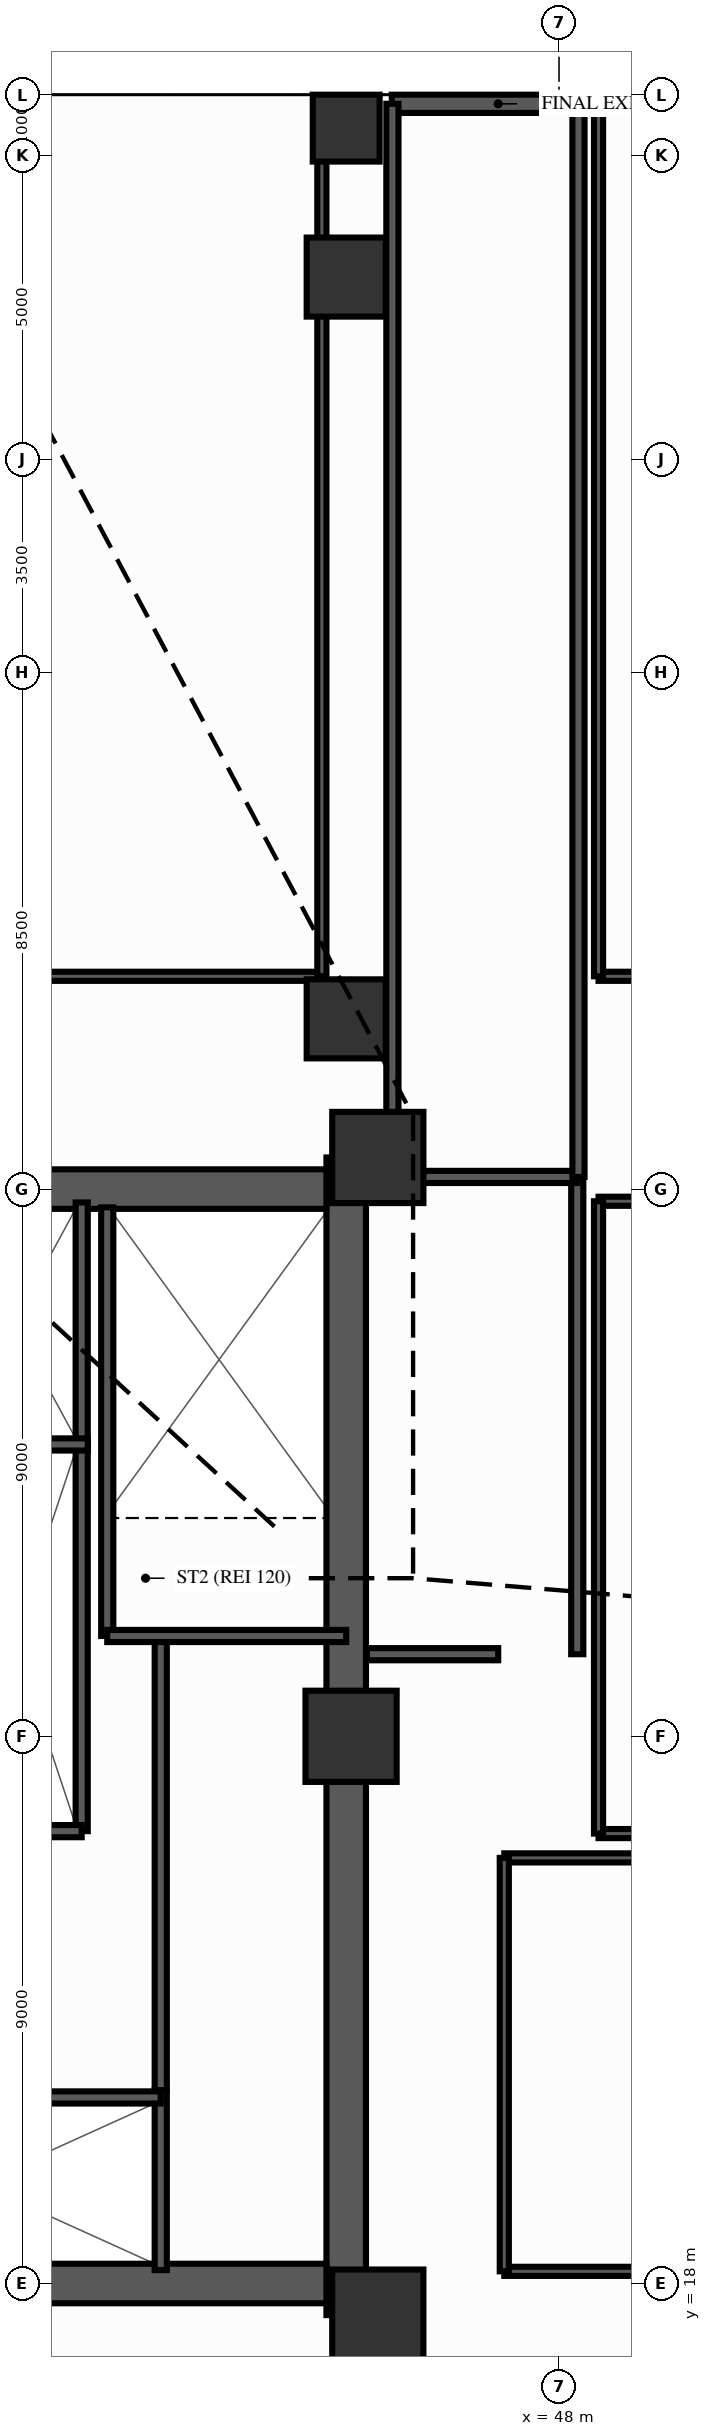
"""IFC4 building model, lengths in metres.
Left out: names, types, materials, properties, quantities, classifications, styles, units other than length and angle.
Written with IfcOpenShell. Run it as: python <this file> out.ifc"""

import sys

from ifc_helpers import new_model, si_unit, direction, frame, frame_2d, origin, origin_2d, place, context, subcontext, project, spatial, rectangle, extrude, source, transform, mapped, element, fill, save


model = new_model("IFC4")
c1 = context("Model", 3, precision=1e-05, world=origin(), true_north=direction((0.0, 1.0)))
c2 = subcontext(c1, "Body", "Model", "MODEL_VIEW")
j1 = project(units=[si_unit("LENGTHUNIT", "METRE"), si_unit("PLANEANGLEUNIT", "RADIAN")], contexts=[c1])
p1 = place(None, origin())
s1 = spatial("IfcSite", under=j1, at=p1, CompositionType="ELEMENT")
p2 = place(p1, origin())
s2 = spatial("IfcBuilding", under=s1, at=p2, CompositionType="ELEMENT")
p3 = place(p2, origin())
s3 = spatial("IfcBuildingStorey", under=s2, at=p3, CompositionType="ELEMENT", Elevation=0.0)
p4 = place(p3, frame((44.5, 17.48, 0.0), z_axis=(0.0, 0.0, 1.0), x_axis=(0.0, 1.0, 0.0)))
e1 = element("IfcWall", 1, at=p4, inside=s3, PredefinedType="SHEAR", context=c2, shape_type="SweptSolid", body=[
    extrude(rectangle(XDim=19.04, YDim=0.65, at=frame_2d((9.52, 0.0))), origin(), (0.0, 0.0, 1.0), 4.2),
])
p5 = place(p4, frame((12.67, 0.0, 0.0), z_axis=(0.0, 0.0, 1.0), x_axis=(-1.0, 0.0, 0.0)))
e2 = element("IfcOpeningElement", 2, at=p5, cuts=e1, PredefinedType="OPENING", context=c2, shape_type="SweptSolid", body=[
    extrude(rectangle(XDim=1.1, YDim=2.15, at=frame_2d((0.55, 1.075))), frame((0.0, 0.337, 0.0), z_axis=(0.0, -1.0, 0.0), x_axis=(1.0, 0.0, 0.0)), (0.0, 0.0, 1.0), 0.674),
])
p6 = place(p3, frame((31.825, 18.0, 0.0), z_axis=(0.0, 0.0, 1.0), x_axis=(1.0, 0.0, 0.0)))
e3 = element("IfcWall", 3, at=p6, inside=s3, PredefinedType="SHEAR", context=c2, shape_type="SweptSolid", body=[
    extrude(rectangle(XDim=12.35, YDim=0.65, at=frame_2d((6.175, 0.0))), origin(), (0.0, 0.0, 1.0), 4.2),
])
p7 = place(p3, frame((31.825, 36.0, 0.0), z_axis=(0.0, 0.0, 1.0), x_axis=(1.0, 0.0, 0.0)))
e4 = element("IfcWall", 4, at=p7, inside=s3, PredefinedType="SHEAR", context=c2, shape_type="SweptSolid", body=[
    extrude(rectangle(XDim=12.35, YDim=0.65, at=frame_2d((6.175, 0.0))), origin(), (0.0, 0.0, 1.0), 4.2),
])
p8 = place(p7, frame((5.125, 0.0, 0.0), z_axis=(0.0, 0.0, 1.0), x_axis=(-1.0, 0.0, 0.0)))
e5 = element("IfcOpeningElement", 5, at=p8, cuts=e4, PredefinedType="OPENING", context=c2, shape_type="SweptSolid", body=[
    extrude(rectangle(XDim=1.4, YDim=2.15, at=frame_2d((0.7, 1.075))), frame((0.0, 0.337, 0.0), z_axis=(0.0, -1.0, 0.0), x_axis=(1.0, 0.0, 0.0)), (0.0, 0.0, 1.0), 0.674),
])
m1 = source(origin(), c2, "Body", "SweptSolid", [
    extrude(rectangle(XDim=1.5, YDim=1.5, at=origin_2d()), origin(), (0.0, 0.0, 1.0), 4.2),
])
for number, where, z_axis, x_axis in (
    (6, (45.02, 17.48, 0.0), (0.0, 0.0, 1.0), (1.0, 0.0, 0.0)),
    (7, (45.02, 36.52, 0.0), (0.0, 0.0, 1.0), (1.0, 0.0, 0.0)),
    (8, (44.58, 27.0, 0.0), (0.0, 0.0, 1.0), (1.0, 0.0, 0.0)),
):
    element("IfcColumn", number, at=place(p3, frame(where, z_axis=z_axis, x_axis=x_axis)), inside=s3, PredefinedType="COLUMN", context=c2, shape_type="MappedRepresentation", body=[
        mapped(m1, transform((0.0, 0.0, 0.0), scale=1.0)),
    ])
m2 = source(origin(), c2, "Body", "SweptSolid", [
    extrude(rectangle(XDim=1.3, YDim=1.3, at=origin_2d()), origin(), (0.0, 0.0, 1.0), 4.2),
])
for number, where, z_axis, x_axis in (
    (9, (44.5, 38.8, 0.0), (0.0, 0.0, 1.0), (1.0, 0.0, 0.0)),
    (10, (44.5, 51.0, 0.0), (0.0, 0.0, 1.0), (1.0, 0.0, 0.0)),
):
    element("IfcColumn", number, at=place(p3, frame(where, z_axis=z_axis, x_axis=x_axis)), inside=s3, PredefinedType="COLUMN", context=c2, shape_type="MappedRepresentation", body=[
        mapped(m2, transform((0.0, 0.0, 0.0), scale=1.0)),
    ])
m3 = source(origin(), c2, "Body", "SweptSolid", [
    extrude(rectangle(XDim=1.1, YDim=1.1, at=origin_2d()), origin(), (0.0, 0.0, 1.0), 4.2),
])
p9 = place(p3, frame((44.5, 53.45, 0.0), z_axis=(0.0, 0.0, 1.0), x_axis=(1.0, 0.0, 0.0)))
e11 = element("IfcColumn", 11, at=p9, inside=s3, PredefinedType="COLUMN", context=c2, shape_type="MappedRepresentation", body=[
    mapped(m3, transform((0.0, 0.0, 0.0), scale=1.0)),
])
p10 = place(p3, frame((45.25, 53.85, 0.0), z_axis=(0.0, 0.0, 1.0), x_axis=(1.0, 0.0, 0.0)))
e12 = element("IfcWall", 12, at=p10, inside=s3, PredefinedType="SOLIDWALL", context=c2, shape_type="SweptSolid", body=[
    extrude(rectangle(XDim=30.75, YDim=0.3, at=frame_2d((15.375, 0.0))), origin(), (0.0, 0.0, 1.0), 3.48),
])
p11 = place(p10, frame((1.05, 0.0, 0.0)))
e13 = element("IfcOpeningElement", 13, at=p11, cuts=e12, PredefinedType="OPENING", context=c2, shape_type="SweptSolid", body=[
    extrude(rectangle(XDim=1.4, YDim=2.2, at=frame_2d((0.7, 1.1))), frame((0.0, 0.162, 0.0), z_axis=(0.0, -1.0, 0.0), x_axis=(1.0, 0.0, 0.0)), (0.0, 0.0, 1.0), 0.324),
])
p12 = place(p3, frame((41.45, 18.22, 0.0), z_axis=(0.0, 0.0, 1.0), x_axis=(0.0, 1.0, 0.0)))
e14 = element("IfcWall", 14, at=p12, inside=s3, PredefinedType="PARTITIONING", context=c2, shape_type="SweptSolid", body=[
    extrude(rectangle(XDim=2.96, YDim=0.2, at=frame_2d((1.48, 0.0))), origin(), (0.0, 0.0, 1.0), 3.92),
])
p13 = place(p3, frame((41.45, 21.18, 0.0), z_axis=(0.0, 0.0, 1.0), x_axis=(0.0, 1.0, 0.0)))
e15 = element("IfcWall", 15, at=p13, inside=s3, PredefinedType="PARTITIONING", context=c2, shape_type="SweptSolid", body=[
    extrude(rectangle(XDim=7.42, YDim=0.2, at=frame_2d((3.71, 0.0))), origin(), (0.0, 0.0, 1.0), 3.92),
])
p14 = place(p13, frame((2.6, 0.0, 0.0)))
e16 = element("IfcOpeningElement", 16, at=p14, cuts=e15, PredefinedType="OPENING", context=c2, shape_type="SweptSolid", body=[
    extrude(rectangle(XDim=0.9, YDim=2.1, at=frame_2d((0.45, 1.05))), frame((0.0, 0.112, 0.0), z_axis=(0.0, -1.0, 0.0), x_axis=(1.0, 0.0, 0.0)), (0.0, 0.0, 1.0), 0.224),
])
p15 = place(p3, frame((40.15, 25.44, 0.0), z_axis=(0.0, 0.0, 1.0), x_axis=(0.0, 1.0, 0.0)))
e17 = element("IfcWall", 17, at=p15, inside=s3, PredefinedType="PARTITIONING", context=c2, shape_type="SweptSolid", body=[
    extrude(rectangle(XDim=6.36, YDim=0.2, at=frame_2d((3.18, 0.0))), origin(), (0.0, 0.0, 1.0), 3.92),
])
p16 = place(p3, frame((40.15, 31.8, 0.0), z_axis=(0.0, 0.0, 1.0), x_axis=(0.0, 1.0, 0.0)))
e18 = element("IfcWall", 18, at=p16, inside=s3, PredefinedType="PARTITIONING", context=c2, shape_type="SweptSolid", body=[
    extrude(rectangle(XDim=3.98, YDim=0.2, at=frame_2d((1.99, 0.0))), origin(), (0.0, 0.0, 1.0), 3.92),
])
p17 = place(p3, frame((35.43, 21.06, 0.0), z_axis=(0.0, 0.0, 1.0), x_axis=(1.0, 0.0, 0.0)))
e19 = element("IfcWall", 19, at=p17, inside=s3, PredefinedType="PARTITIONING", context=c2, shape_type="SweptSolid", body=[
    extrude(rectangle(XDim=6.02, YDim=0.2, at=frame_2d((3.01, 0.0))), origin(), (0.0, 0.0, 1.0), 3.92),
])
p18 = place(p17, frame((1.0, 0.0, 0.0)))
e20 = element("IfcOpeningElement", 20, at=p18, cuts=e19, PredefinedType="OPENING", context=c2, shape_type="SweptSolid", body=[
    extrude(rectangle(XDim=1.1, YDim=2.15, at=frame_2d((0.55, 1.075))), frame((0.0, 0.112, 0.0), z_axis=(0.0, -1.0, 0.0), x_axis=(1.0, 0.0, 0.0)), (0.0, 0.0, 1.0), 0.224),
])
p19 = place(p17, frame((2.95, 0.0, 0.0)))
e21 = element("IfcOpeningElement", 21, at=p19, cuts=e19, PredefinedType="OPENING", context=c2, shape_type="SweptSolid", body=[
    extrude(rectangle(XDim=1.1, YDim=2.15, at=frame_2d((0.55, 1.075))), frame((0.0, 0.112, 0.0), z_axis=(0.0, -1.0, 0.0), x_axis=(1.0, 0.0, 0.0)), (0.0, 0.0, 1.0), 0.224),
])
p20 = place(p17, frame((4.58, 0.0, 0.0)))
e22 = element("IfcOpeningElement", 22, at=p20, cuts=e19, PredefinedType="OPENING", context=c2, shape_type="SweptSolid", body=[
    extrude(rectangle(XDim=1.2, YDim=2.15, at=frame_2d((0.6, 1.075))), frame((0.0, 0.112, 0.0), z_axis=(0.0, -1.0, 0.0), x_axis=(1.0, 0.0, 0.0)), (0.0, 0.0, 1.0), 0.224),
])
p21 = place(p3, frame((35.43, 25.44, 0.0), z_axis=(0.0, 0.0, 1.0), x_axis=(1.0, 0.0, 0.0)))
e23 = element("IfcWall", 23, at=p21, inside=s3, PredefinedType="PARTITIONING", context=c2, shape_type="SweptSolid", body=[
    extrude(rectangle(XDim=4.72, YDim=0.2, at=frame_2d((2.36, 0.0))), origin(), (0.0, 0.0, 1.0), 3.92),
])
p22 = place(p21, frame((1.25, 0.0, 0.0)))
e24 = element("IfcOpeningElement", 24, at=p22, cuts=e23, PredefinedType="OPENING", context=c2, shape_type="SweptSolid", body=[
    extrude(rectangle(XDim=1.1, YDim=2.15, at=frame_2d((0.55, 1.075))), frame((0.0, 0.112, 0.0), z_axis=(0.0, -1.0, 0.0), x_axis=(1.0, 0.0, 0.0)), (0.0, 0.0, 1.0), 0.224),
])
p23 = place(p3, frame((40.57, 28.65, 0.0), z_axis=(0.0, 0.0, 1.0), x_axis=(0.0, 1.0, 0.0)))
e25 = element("IfcWall", 25, at=p23, inside=s3, PredefinedType="SOLIDWALL", context=c2, shape_type="SweptSolid", body=[
    extrude(rectangle(XDim=7.05, YDim=0.2, at=frame_2d((3.525, 0.0))), origin(), (0.0, 0.0, 1.0), 3.92),
])
p24 = place(p3, frame((40.57, 28.65, 0.0), z_axis=(0.0, 0.0, 1.0), x_axis=(1.0, 0.0, 0.0)))
e26 = element("IfcWall", 26, at=p24, inside=s3, PredefinedType="SOLIDWALL", context=c2, shape_type="SweptSolid", body=[
    extrude(rectangle(XDim=3.93, YDim=0.2, at=frame_2d((1.965, 0.0))), origin(), (0.0, 0.0, 1.0), 3.92),
])
p25 = place(p3, frame((37.9, 31.8, 0.0), z_axis=(0.0, 0.0, 1.0), x_axis=(1.0, 0.0, 0.0)))
e27 = element("IfcWall", 27, at=p25, inside=s3, PredefinedType="PARTITIONING", context=c2, shape_type="SweptSolid", body=[
    extrude(rectangle(XDim=2.35, YDim=0.2, at=frame_2d((1.175, 0.0))), origin(), (0.0, 0.0, 1.0), 3.92),
])
p26 = place(p3, frame((44.84, 28.35, 0.0), z_axis=(0.0, 0.0, 1.0), x_axis=(1.0, 0.0, 0.0)))
e28 = element("IfcWall", 28, at=p26, inside=s3, PredefinedType="PARTITIONING", context=c2, shape_type="SweptSolid", body=[
    extrude(rectangle(XDim=2.16, YDim=0.2, at=frame_2d((1.08, 0.0))), origin(), (0.0, 0.0, 1.0), 3.92),
])
p27 = place(p26, frame((0.55, 0.0, 0.0)))
e29 = element("IfcOpeningElement", 29, at=p27, cuts=e28, PredefinedType="OPENING", context=c2, shape_type="SweptSolid", body=[
    extrude(rectangle(XDim=1.1, YDim=2.15, at=frame_2d((0.55, 1.075))), frame((0.0, 0.112, 0.0), z_axis=(0.0, -1.0, 0.0), x_axis=(1.0, 0.0, 0.0)), (0.0, 0.0, 1.0), 0.224),
])
p28 = place(p3, frame((48.3, 28.35, 0.0), z_axis=(0.0, 0.0, 1.0), x_axis=(0.0, 1.0, 0.0)))
e30 = element("IfcWall", 30, at=p28, inside=s3, PredefinedType="PARTITIONING", context=c2, shape_type="SweptSolid", body=[
    extrude(rectangle(XDim=7.85, YDim=0.2, at=frame_2d((3.925, 0.0))), origin(), (0.0, 0.0, 1.0), 3.92),
])
p29 = place(p3, frame((44.84, 36.2, 0.0), z_axis=(0.0, 0.0, 1.0), x_axis=(1.0, 0.0, 0.0)))
e31 = element("IfcWall", 31, at=p29, inside=s3, PredefinedType="PARTITIONING", context=c2, shape_type="SweptSolid", body=[
    extrude(rectangle(XDim=3.46, YDim=0.2, at=frame_2d((1.73, 0.0))), origin(), (0.0, 0.0, 1.0), 3.29),
])
p30 = place(p29, frame((1.36, 0.0, 0.0)))
e32 = element("IfcOpeningElement", 32, at=p30, cuts=e31, PredefinedType="OPENING", context=c2, shape_type="SweptSolid", body=[
    extrude(rectangle(XDim=1.1, YDim=2.15, at=frame_2d((0.55, 1.075))), frame((0.0, 0.112, 0.0), z_axis=(0.0, -1.0, 0.0), x_axis=(1.0, 0.0, 0.0)), (0.0, 0.0, 1.0), 0.224),
])
p31 = place(p3, frame((45.26, 36.2, 0.0), z_axis=(0.0, 0.0, 1.0), x_axis=(0.0, 1.0, 0.0)))
e33 = element("IfcWall", 33, at=p31, inside=s3, PredefinedType="PARTITIONING", context=c2, shape_type="SweptSolid", body=[
    extrude(rectangle(XDim=17.65, YDim=0.2, at=frame_2d((8.825, 0.0))), origin(), (0.0, 0.0, 1.0), 3.44),
])
p32 = place(p3, frame((48.32, 36.2, 0.0), z_axis=(0.0, 0.0, 1.0), x_axis=(0.0, 1.0, 0.0)))
e34 = element("IfcWall", 34, at=p32, inside=s3, PredefinedType="PARTITIONING", context=c2, shape_type="SweptSolid", body=[
    extrude(rectangle(XDim=17.65, YDim=0.2, at=frame_2d((8.825, 0.0))), origin(), (0.0, 0.0, 1.0), 3.92),
])
p33 = place(p32, frame((1.65, 0.0, 0.0)))
e35 = element("IfcOpeningElement", 35, at=p33, cuts=e34, PredefinedType="OPENING", context=c2, shape_type="SweptSolid", body=[
    extrude(rectangle(XDim=1.1, YDim=2.15, at=frame_2d((0.55, 1.075))), frame((0.0, 0.112, 0.0), z_axis=(0.0, -1.0, 0.0), x_axis=(1.0, 0.0, 0.0)), (0.0, 0.0, 1.0), 0.224),
])
for number, where, z_axis, x_axis in (
    (36, (47.1, 18.2, 0.0), (0.0, 0.0, 1.0), (1.0, 0.0, 0.0)),
    (37, (47.1, 25.0, 0.0), (0.0, 0.0, 1.0), (1.0, 0.0, 0.0)),
):
    element("IfcWall", number, at=place(p3, frame(where, z_axis=z_axis, x_axis=x_axis)), inside=s3, PredefinedType="PARTITIONING", context=c2, shape_type="SweptSolid", body=[
        extrude(rectangle(XDim=7.4, YDim=0.15, at=frame_2d((3.7, 0.0))), origin(), (0.0, 0.0, 1.0), 3.92),
    ])
p34 = place(p3, frame((47.1, 18.2, 0.0), z_axis=(0.0, 0.0, 1.0), x_axis=(0.0, 1.0, 0.0)))
e38 = element("IfcWall", 38, at=p34, inside=s3, PredefinedType="PARTITIONING", context=c2, shape_type="SweptSolid", body=[
    extrude(rectangle(XDim=6.8, YDim=0.15, at=frame_2d((3.4, 0.0))), origin(), (0.0, 0.0, 1.0), 3.92),
])
p35 = place(p34, frame((2.694, 0.0, 0.0)))
e39 = element("IfcOpeningElement", 39, at=p35, cuts=e38, PredefinedType="OPENING", context=c2, shape_type="SweptSolid", body=[
    extrude(rectangle(XDim=1.1, YDim=2.15, at=frame_2d((0.55, 1.075))), frame((0.0, 0.087, 0.0), z_axis=(0.0, -1.0, 0.0), x_axis=(1.0, 0.0, 0.0)), (0.0, 0.0, 1.0), 0.174),
])
p36 = place(p3, frame((35.3, 39.5, 0.0), z_axis=(0.0, 0.0, 1.0), x_axis=(1.0, 0.0, 0.0)))
e40 = element("IfcWall", 40, at=p36, inside=s3, PredefinedType="PARTITIONING", context=c2, shape_type="SweptSolid", body=[
    extrude(rectangle(XDim=8.8, YDim=0.15, at=frame_2d((4.4, 0.0))), origin(), (0.0, 0.0, 1.0), 3.92),
])
p37 = place(p36, frame((4.566, 0.0, 0.0)))
e41 = element("IfcOpeningElement", 41, at=p37, cuts=e40, PredefinedType="OPENING", context=c2, shape_type="SweptSolid", body=[
    extrude(rectangle(XDim=1.0, YDim=2.1, at=frame_2d((0.5, 1.05))), frame((0.0, 0.087, 0.0), z_axis=(0.0, -1.0, 0.0), x_axis=(1.0, 0.0, 0.0)), (0.0, 0.0, 1.0), 0.174),
])
p38 = place(p3, frame((44.1, 39.5, 0.0), z_axis=(0.0, 0.0, 1.0), x_axis=(0.0, 1.0, 0.0)))
e42 = element("IfcWall", 42, at=p38, inside=s3, PredefinedType="PARTITIONING", context=c2, shape_type="SweptSolid", body=[
    extrude(rectangle(XDim=14.4, YDim=0.15, at=frame_2d((7.2, 0.0))), origin(), (0.0, 0.0, 1.0), 3.92),
])
p39 = place(p3, frame((48.65, 39.5, 0.0), z_axis=(0.0, 0.0, 1.0), x_axis=(1.0, 0.0, 0.0)))
e43 = element("IfcWall", 43, at=p39, inside=s3, PredefinedType="PARTITIONING", context=c2, shape_type="SweptSolid", body=[
    extrude(rectangle(XDim=13.85, YDim=0.15, at=frame_2d((6.925, 0.0))), origin(), (0.0, 0.0, 1.0), 3.92),
])
p40 = place(p39, frame((6.045, 0.0, 0.0)))
e44 = element("IfcOpeningElement", 44, at=p40, cuts=e43, PredefinedType="OPENING", context=c2, shape_type="SweptSolid", body=[
    extrude(rectangle(XDim=1.0, YDim=2.1, at=frame_2d((0.5, 1.05))), frame((0.0, 0.087, 0.0), z_axis=(0.0, -1.0, 0.0), x_axis=(1.0, 0.0, 0.0)), (0.0, 0.0, 1.0), 0.174),
])
p41 = place(p3, frame((48.65, 39.5, 0.0), z_axis=(0.0, 0.0, 1.0), x_axis=(0.0, 1.0, 0.0)))
e45 = element("IfcWall", 45, at=p41, inside=s3, PredefinedType="PARTITIONING", context=c2, shape_type="SweptSolid", body=[
    extrude(rectangle(XDim=14.4, YDim=0.15, at=frame_2d((7.2, 0.0))), origin(), (0.0, 0.0, 1.0), 3.92),
])
for number, where, z_axis, x_axis in (
    (46, (48.65, 25.4, 0.0), (0.0, 0.0, 1.0), (1.0, 0.0, 0.0)),
    (47, (48.65, 35.8, 0.0), (0.0, 0.0, 1.0), (1.0, 0.0, 0.0)),
):
    element("IfcWall", number, at=place(p3, frame(where, z_axis=z_axis, x_axis=x_axis)), inside=s3, PredefinedType="PARTITIONING", context=c2, shape_type="SweptSolid", body=[
        extrude(rectangle(XDim=15.25, YDim=0.15, at=frame_2d((7.625, 0.0))), origin(), (0.0, 0.0, 1.0), 3.92),
    ])
p42 = place(p3, frame((48.65, 25.4, 0.0), z_axis=(0.0, 0.0, 1.0), x_axis=(0.0, 1.0, 0.0)))
e48 = element("IfcWall", 48, at=p42, inside=s3, PredefinedType="PARTITIONING", context=c2, shape_type="SweptSolid", body=[
    extrude(rectangle(XDim=10.4, YDim=0.15, at=frame_2d((5.2, 0.0))), origin(), (0.0, 0.0, 1.0), 3.92),
])
m4 = source(origin(), c2, "Body", "SweptSolid", [
    extrude(rectangle(XDim=1.4, YDim=2.2, at=frame_2d((0.7, 1.1))), frame((0.0, 0.025, 0.0), z_axis=(0.0, -1.0, 0.0), x_axis=(1.0, 0.0, 0.0)), (0.0, 0.0, 1.0), 0.05),
])
p43 = place(p11, origin())
e49 = element("IfcDoor", 49, at=p43, inside=s3, OperationType="SINGLE_SWING_RIGHT", PredefinedType="DOOR", context=c2, shape_type="MappedRepresentation", body=[
    mapped(m4, transform((0.0, 0.0, 0.0), scale=1.0)),
])
fill(e13, e49)
m5 = source(origin(), c2, "Body", "SweptSolid", [
    extrude(rectangle(XDim=1.1, YDim=2.15, at=frame_2d((0.55, 1.075))), frame((0.0, 0.025, 0.0), z_axis=(0.0, -1.0, 0.0), x_axis=(1.0, 0.0, 0.0)), (0.0, 0.0, 1.0), 0.05),
])
p44 = place(p5, origin())
e50 = element("IfcDoor", 50, at=p44, inside=s3, OperationType="SINGLE_SWING_RIGHT", PredefinedType="DOOR", context=c2, shape_type="MappedRepresentation", body=[
    mapped(m5, transform((0.0, 0.0, 0.0), scale=1.0)),
])
fill(e2, e50)
m6 = source(origin(), c2, "Body", "SweptSolid", [
    extrude(rectangle(XDim=0.9, YDim=2.1, at=frame_2d((0.45, 1.05))), frame((0.0, 0.025, 0.0), z_axis=(0.0, -1.0, 0.0), x_axis=(1.0, 0.0, 0.0)), (0.0, 0.0, 1.0), 0.05),
])
p45 = place(p14, origin())
e51 = element("IfcDoor", 51, at=p45, inside=s3, OperationType="SINGLE_SWING_LEFT", PredefinedType="DOOR", context=c2, shape_type="MappedRepresentation", body=[
    mapped(m6, transform((0.0, 0.0, 0.0), scale=1.0)),
])
fill(e16, e51)
m7 = source(origin(), c2, "Body", "SweptSolid", [
    extrude(rectangle(XDim=1.2, YDim=2.15, at=frame_2d((0.6, 1.075))), frame((0.0, 0.025, 0.0), z_axis=(0.0, -1.0, 0.0), x_axis=(1.0, 0.0, 0.0)), (0.0, 0.0, 1.0), 0.05),
])
p46 = place(p20, origin())
e52 = element("IfcDoor", 52, at=p46, inside=s3, OperationType="DOUBLE_DOOR_SLIDING", PredefinedType="DOOR", context=c2, shape_type="MappedRepresentation", body=[
    mapped(m7, transform((0.0, 0.0, 0.0), scale=1.0)),
])
fill(e22, e52)
p47 = place(p27, origin())
e53 = element("IfcDoor", 53, at=p47, inside=s3, OperationType="SINGLE_SWING_LEFT", PredefinedType="DOOR", context=c2, shape_type="MappedRepresentation", body=[
    mapped(m5, transform((0.0, 0.0, 0.0), scale=1.0)),
])
fill(e29, e53)
p48 = place(p30, origin())
e54 = element("IfcDoor", 54, at=p48, inside=s3, OperationType="SINGLE_SWING_RIGHT", PredefinedType="DOOR", context=c2, shape_type="MappedRepresentation", body=[
    mapped(m5, transform((0.0, 0.0, 0.0), scale=1.0)),
])
fill(e32, e54)
p49 = place(p33, origin())
e55 = element("IfcDoor", 55, at=p49, inside=s3, OperationType="SINGLE_SWING_LEFT", PredefinedType="DOOR", context=c2, shape_type="MappedRepresentation", body=[
    mapped(m5, transform((0.0, 0.0, 0.0), scale=1.0)),
])
fill(e35, e55)
p50 = place(p35, origin())
e56 = element("IfcDoor", 56, at=p50, inside=s3, OperationType="SINGLE_SWING_LEFT", PredefinedType="DOOR", context=c2, shape_type="MappedRepresentation", body=[
    mapped(m5, transform((0.0, 0.0, 0.0), scale=1.0)),
])
fill(e39, e56)
m8 = source(origin(), c2, "Body", "SweptSolid", [
    extrude(rectangle(XDim=1.0, YDim=2.1, at=frame_2d((0.5, 1.05))), frame((0.0, 0.025, 0.0), z_axis=(0.0, -1.0, 0.0), x_axis=(1.0, 0.0, 0.0)), (0.0, 0.0, 1.0), 0.05),
])
p51 = place(p37, origin())
e57 = element("IfcDoor", 57, at=p51, inside=s3, OperationType="SINGLE_SWING_LEFT", PredefinedType="DOOR", context=c2, shape_type="MappedRepresentation", body=[
    mapped(m8, transform((0.0, 0.0, 0.0), scale=1.0)),
])
fill(e41, e57)
save(model, sys.argv[1])
